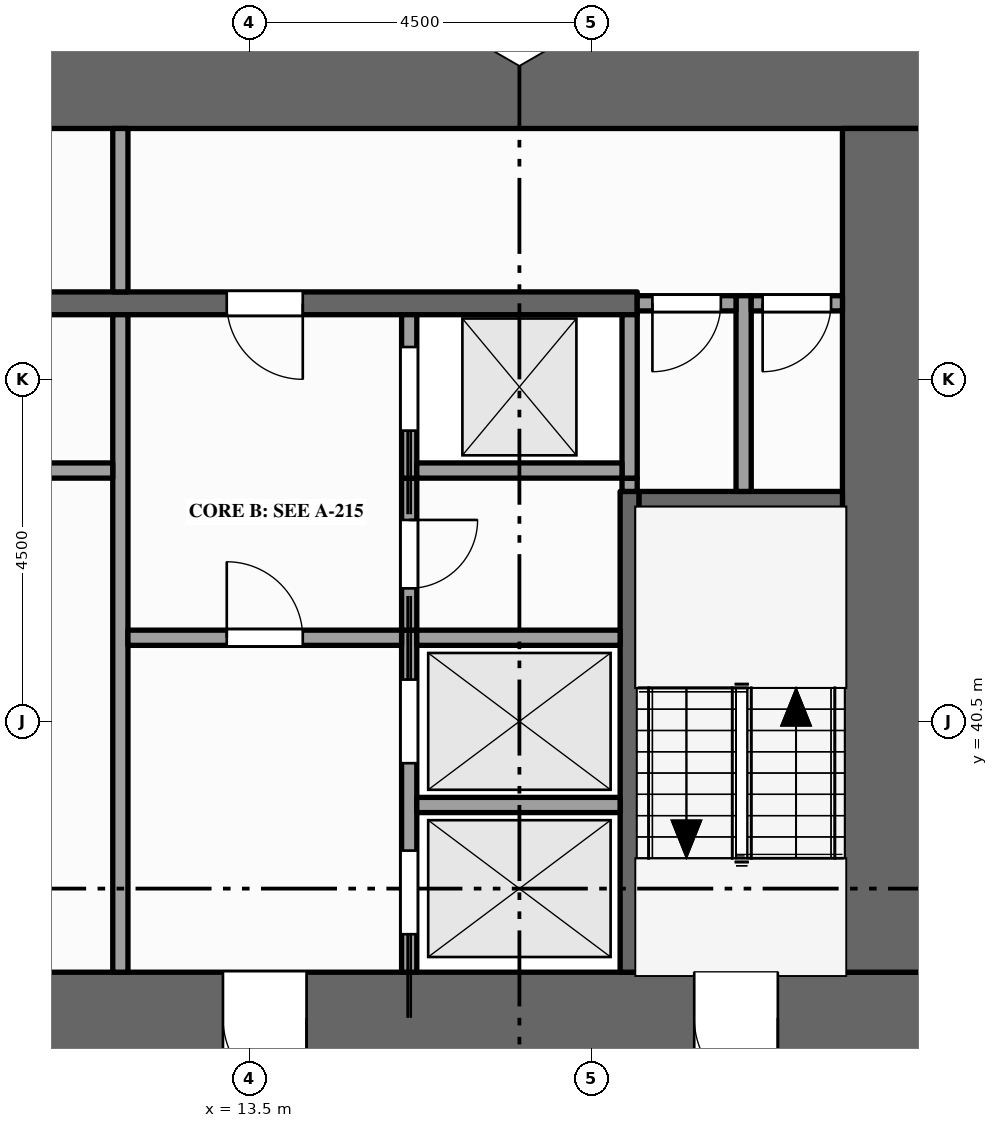
"""IFC4 building model, lengths in metres.
Left out: names, types, materials, properties, quantities, classifications, styles, units other than length and angle.
Written with IfcOpenShell. Run it as: python <this file> out.ifc"""

import sys

from ifc_helpers import new_model, si_unit, direction, frame, frame_2d, origin, place, context, subcontext, project, spatial, rectangle, extrude, element, fill, save


model = new_model("IFC4")
c1 = context("Model", 3, precision=1e-05, world=origin(), true_north=direction((0.0, 1.0)))
c2 = subcontext(c1, "Body", "Model", "MODEL_VIEW")
j1 = project(units=[si_unit("LENGTHUNIT", "METRE"), si_unit("PLANEANGLEUNIT", "RADIAN")], contexts=[c1])
p1 = place(None, origin())
s1 = spatial("IfcSite", under=j1, at=p1, CompositionType="ELEMENT")
p2 = place(p1, origin())
s2 = spatial("IfcBuilding", under=s1, at=p2, CompositionType="ELEMENT")
p3 = place(p2, frame((0.0, 0.0, 77.0)))
s3 = spatial("IfcBuildingStorey", under=s2, at=p3, CompositionType="ELEMENT", Elevation=77.0)
p4 = place(p3, frame((0.0, 36.6, -0.15), z_axis=(0.0, 0.0, 1.0), x_axis=(1.0, 0.0, 0.0)))
e1 = element("IfcWall", 1, at=p4, inside=s3, PredefinedType="SHEAR", context=c2, shape_type="SweptSolid", body=[
    extrude(rectangle(XDim=22.5, YDim=1.2, at=frame_2d((11.25, 0.0))), origin(), (0.0, 0.0, 1.0), 6.0),
])
p5 = place(p4, frame((7.1, 0.0, 0.15)))
e2 = element("IfcOpeningElement", 2, at=p5, cuts=e1, PredefinedType="OPENING", context=c2, shape_type="SweptSolid", body=[
    extrude(rectangle(XDim=1.8, YDim=2.1, at=frame_2d((0.9, 1.05))), frame((0.0, 0.61, 0.0), z_axis=(0.0, -1.0, 0.0), x_axis=(1.0, 0.0, 0.0)), (0.0, 0.0, 1.0), 1.22),
])
p6 = place(p4, frame((13.15, 0.0, 0.15)))
e3 = element("IfcOpeningElement", 3, at=p6, cuts=e1, PredefinedType="OPENING", context=c2, shape_type="SweptSolid", body=[
    extrude(rectangle(XDim=1.1, YDim=2.1, at=frame_2d((0.55, 1.05))), frame((0.0, 0.61, 0.0), z_axis=(0.0, -1.0, 0.0), x_axis=(1.0, 0.0, 0.0)), (0.0, 0.0, 1.0), 1.22),
])
p7 = place(p4, frame((2.15, 0.0, 0.15)))
e4 = element("IfcOpeningElement", 4, at=p7, cuts=e1, PredefinedType="OPENING", context=c2, shape_type="SweptSolid", body=[
    extrude(rectangle(XDim=1.1, YDim=2.1, at=frame_2d((0.55, 1.05))), frame((0.0, 0.61, 0.0), z_axis=(0.0, -1.0, 0.0), x_axis=(1.0, 0.0, 0.0)), (0.0, 0.0, 1.0), 1.22),
])
p8 = place(p4, frame((19.35, 0.0, 0.15)))
e5 = element("IfcOpeningElement", 5, at=p8, cuts=e1, PredefinedType="OPENING", context=c2, shape_type="SweptSolid", body=[
    extrude(rectangle(XDim=1.1, YDim=2.1, at=frame_2d((0.55, 1.05))), frame((0.0, 0.61, 0.0), z_axis=(0.0, -1.0, 0.0), x_axis=(1.0, 0.0, 0.0)), (0.0, 0.0, 1.0), 1.22),
])
p9 = place(p3, frame((0.0, 48.9, -0.15), z_axis=(0.0, 0.0, 1.0), x_axis=(1.0, 0.0, 0.0)))
e6 = element("IfcWall", 6, at=p9, inside=s3, PredefinedType="SHEAR", context=c2, shape_type="SweptSolid", body=[
    extrude(rectangle(XDim=22.5, YDim=1.2, at=frame_2d((11.25, 0.0))), origin(), (0.0, 0.0, 1.0), 6.0),
])
p10 = place(p3, frame((21.9, 37.2, -0.15), z_axis=(0.0, 0.0, 1.0), x_axis=(0.0, 1.0, 0.0)))
e7 = element("IfcWall", 7, at=p10, inside=s3, PredefinedType="SHEAR", context=c2, shape_type="SweptSolid", body=[
    extrude(rectangle(XDim=11.1, YDim=1.2, at=frame_2d((5.55, 0.0))), origin(), (0.0, 0.0, 1.0), 6.0),
])
p11 = place(p3, frame((11.8, 37.2, 0.0), z_axis=(0.0, 0.0, 1.0), x_axis=(0.0, 1.0, 0.0)))
e8 = element("IfcWall", 8, at=p11, inside=s3, PredefinedType="PARTITIONING", context=c2, shape_type="SweptSolid", body=[
    extrude(rectangle(XDim=8.65, YDim=0.2, at=frame_2d((4.325, 0.0))), origin(), (0.0, 0.0, 1.0), 5.85),
])
p12 = place(p3, frame((11.8, 46.15, 0.0), z_axis=(0.0, 0.0, 1.0), x_axis=(0.0, 1.0, 0.0)))
e9 = element("IfcWall", 9, at=p12, inside=s3, PredefinedType="PARTITIONING", context=c2, shape_type="SweptSolid", body=[
    extrude(rectangle(XDim=2.15, YDim=0.2, at=frame_2d((1.075, 0.0))), origin(), (0.0, 0.0, 1.0), 5.85),
])
p13 = place(p3, frame((15.6, 37.2, 0.0), z_axis=(0.0, 0.0, 1.0), x_axis=(0.0, 1.0, 0.0)))
e10 = element("IfcWall", 10, at=p13, inside=s3, PredefinedType="SOLIDWALL", context=c2, shape_type="SweptSolid", body=[
    extrude(rectangle(XDim=4.5, YDim=0.2, at=frame_2d((2.25, 0.0))), origin(), (0.0, 0.0, 1.0), 5.85),
])
p14 = place(p13, frame((0.5, 0.0, 0.012)))
e11 = element("IfcOpeningElement", 11, at=p14, cuts=e10, PredefinedType="OPENING", context=c2, shape_type="SweptSolid", body=[
    extrude(rectangle(XDim=1.1, YDim=2.1, at=frame_2d((0.55, 1.05))), frame((0.0, 0.11, 0.0), z_axis=(0.0, -1.0, 0.0), x_axis=(1.0, 0.0, 0.0)), (0.0, 0.0, 1.0), 0.22),
])
p15 = place(p13, frame((2.75, 0.0, 0.012)))
e12 = element("IfcOpeningElement", 12, at=p15, cuts=e10, PredefinedType="OPENING", context=c2, shape_type="SweptSolid", body=[
    extrude(rectangle(XDim=1.1, YDim=2.1, at=frame_2d((0.55, 1.05))), frame((0.0, 0.11, 0.0), z_axis=(0.0, -1.0, 0.0), x_axis=(1.0, 0.0, 0.0)), (0.0, 0.0, 1.0), 0.22),
])
p16 = place(p3, frame((15.6, 41.7, 0.0), z_axis=(0.0, 0.0, 1.0), x_axis=(0.0, 1.0, 0.0)))
e13 = element("IfcWall", 13, at=p16, inside=s3, PredefinedType="PARTITIONING", context=c2, shape_type="SweptSolid", body=[
    extrude(rectangle(XDim=2.0, YDim=0.2, at=frame_2d((1.0, 0.0))), origin(), (0.0, 0.0, 1.0), 5.85),
])
p17 = place(p16, frame((0.55, 0.0, 0.0)))
e14 = element("IfcOpeningElement", 14, at=p17, cuts=e13, PredefinedType="OPENING", context=c2, shape_type="SweptSolid", body=[
    extrude(rectangle(XDim=0.9, YDim=2.1, at=frame_2d((0.45, 1.05))), frame((0.0, 0.11, 0.0), z_axis=(0.0, -1.0, 0.0), x_axis=(1.0, 0.0, 0.0)), (0.0, 0.0, 1.0), 0.22),
])
p18 = place(p3, frame((15.6, 43.7, 0.0), z_axis=(0.0, 0.0, 1.0), x_axis=(0.0, 1.0, 0.0)))
e15 = element("IfcWall", 15, at=p18, inside=s3, PredefinedType="SOLIDWALL", context=c2, shape_type="SweptSolid", body=[
    extrude(rectangle(XDim=2.15, YDim=0.2, at=frame_2d((1.075, 0.0))), origin(), (0.0, 0.0, 1.0), 5.85),
])
p19 = place(p18, frame((0.625, 0.0, 0.012)))
e16 = element("IfcOpeningElement", 16, at=p19, cuts=e15, PredefinedType="OPENING", context=c2, shape_type="SweptSolid", body=[
    extrude(rectangle(XDim=1.1, YDim=2.1, at=frame_2d((0.55, 1.05))), frame((0.0, 0.11, 0.0), z_axis=(0.0, -1.0, 0.0), x_axis=(1.0, 0.0, 0.0)), (0.0, 0.0, 1.0), 0.22),
])
p20 = place(p3, frame((18.5, 37.2, 0.0), z_axis=(0.0, 0.0, 1.0), x_axis=(0.0, 1.0, 0.0)))
e17 = element("IfcWall", 17, at=p20, inside=s3, PredefinedType="SHEAR", context=c2, shape_type="SweptSolid", body=[
    extrude(rectangle(XDim=6.325, YDim=0.25, at=frame_2d((3.163, 0.0))), origin(), (0.0, 0.0, 1.0), 5.85),
])
p21 = place(p3, frame((18.5, 43.525, 0.0), z_axis=(0.0, 0.0, 1.0), x_axis=(0.0, 1.0, 0.0)))
e18 = element("IfcWall", 18, at=p21, inside=s3, PredefinedType="PARTITIONING", context=c2, shape_type="SweptSolid", body=[
    extrude(rectangle(XDim=0.175, YDim=0.2, at=frame_2d((0.087, 0.0))), origin(), (0.0, 0.0, 1.0), 5.85),
])
p22 = place(p3, frame((18.5, 43.7, 0.0), z_axis=(0.0, 0.0, 1.0), x_axis=(0.0, 1.0, 0.0)))
e19 = element("IfcWall", 19, at=p22, inside=s3, PredefinedType="SOLIDWALL", context=c2, shape_type="SweptSolid", body=[
    extrude(rectangle(XDim=2.15, YDim=0.2, at=frame_2d((1.075, 0.0))), origin(), (0.0, 0.0, 1.0), 5.85),
])
p23 = place(p3, frame((20.0, 43.525, 0.0), z_axis=(0.0, 0.0, 1.0), x_axis=(0.0, 1.0, 0.0)))
e20 = element("IfcWall", 20, at=p23, inside=s3, PredefinedType="PARTITIONING", context=c2, shape_type="SweptSolid", body=[
    extrude(rectangle(XDim=2.575, YDim=0.2, at=frame_2d((1.288, 0.0))), origin(), (0.0, 0.0, 1.0), 5.85),
])
p24 = place(p3, frame((15.7, 39.4, 0.0), z_axis=(0.0, 0.0, 1.0), x_axis=(1.0, 0.0, 0.0)))
e21 = element("IfcWall", 21, at=p24, inside=s3, PredefinedType="SOLIDWALL", context=c2, shape_type="SweptSolid", body=[
    extrude(rectangle(XDim=2.675, YDim=0.2, at=frame_2d((1.337, 0.0))), origin(), (0.0, 0.0, 1.0), 5.85),
])
p25 = place(p3, frame((11.9, 41.6, 0.0), z_axis=(0.0, 0.0, 1.0), x_axis=(1.0, 0.0, 0.0)))
e22 = element("IfcWall", 22, at=p25, inside=s3, PredefinedType="PARTITIONING", context=c2, shape_type="SweptSolid", body=[
    extrude(rectangle(XDim=3.6, YDim=0.2, at=frame_2d((1.8, 0.0))), origin(), (0.0, 0.0, 1.0), 5.85),
])
p26 = place(p25, frame((1.3, 0.0, 0.0)))
e23 = element("IfcOpeningElement", 23, at=p26, cuts=e22, PredefinedType="OPENING", context=c2, shape_type="SweptSolid", body=[
    extrude(rectangle(XDim=1.0, YDim=2.1, at=frame_2d((0.5, 1.05))), frame((0.0, 0.11, 0.0), z_axis=(0.0, -1.0, 0.0), x_axis=(1.0, 0.0, 0.0)), (0.0, 0.0, 1.0), 0.22),
])
p27 = place(p3, frame((15.7, 41.6, 0.0), z_axis=(0.0, 0.0, 1.0), x_axis=(1.0, 0.0, 0.0)))
e24 = element("IfcWall", 24, at=p27, inside=s3, PredefinedType="SOLIDWALL", context=c2, shape_type="SweptSolid", body=[
    extrude(rectangle(XDim=2.675, YDim=0.2, at=frame_2d((1.337, 0.0))), origin(), (0.0, 0.0, 1.0), 5.85),
])
p28 = place(p3, frame((18.625, 43.4, 0.0), z_axis=(0.0, 0.0, 1.0), x_axis=(1.0, 0.0, 0.0)))
e25 = element("IfcWall", 25, at=p28, inside=s3, PredefinedType="SHEAR", context=c2, shape_type="SweptSolid", body=[
    extrude(rectangle(XDim=2.675, YDim=0.25, at=frame_2d((1.337, 0.0))), origin(), (0.0, 0.0, 1.0), 5.85),
])
p29 = place(p3, frame((9.5, 43.8, 0.0), z_axis=(0.0, 0.0, 1.0), x_axis=(1.0, 0.0, 0.0)))
e26 = element("IfcWall", 26, at=p29, inside=s3, PredefinedType="PARTITIONING", context=c2, shape_type="SweptSolid", body=[
    extrude(rectangle(XDim=2.2, YDim=0.2, at=frame_2d((1.1, 0.0))), origin(), (0.0, 0.0, 1.0), 5.85),
])
p30 = place(p3, frame((15.7, 43.8, 0.0), z_axis=(0.0, 0.0, 1.0), x_axis=(1.0, 0.0, 0.0)))
e27 = element("IfcWall", 27, at=p30, inside=s3, PredefinedType="SOLIDWALL", context=c2, shape_type="SweptSolid", body=[
    extrude(rectangle(XDim=2.7, YDim=0.2, at=frame_2d((1.35, 0.0))), origin(), (0.0, 0.0, 1.0), 5.85),
])
p31 = place(p3, frame((4.1, 46.0, 0.0), z_axis=(0.0, 0.0, 1.0), x_axis=(1.0, 0.0, 0.0)))
e28 = element("IfcWall", 28, at=p31, inside=s3, PredefinedType="SHEAR", context=c2, shape_type="SweptSolid", body=[
    extrude(rectangle(XDim=14.5, YDim=0.3, at=frame_2d((7.25, 0.0))), origin(), (0.0, 0.0, 1.0), 5.85),
])
p32 = place(p31, frame((3.4, 0.0, 0.0)))
e29 = element("IfcOpeningElement", 29, at=p32, cuts=e28, PredefinedType="OPENING", context=c2, shape_type="SweptSolid", body=[
    extrude(rectangle(XDim=1.0, YDim=2.1, at=frame_2d((0.5, 1.05))), frame((0.0, 0.16, 0.0), z_axis=(0.0, -1.0, 0.0), x_axis=(1.0, 0.0, 0.0)), (0.0, 0.0, 1.0), 0.32),
])
p33 = place(p31, frame((9.1, 0.0, 0.0)))
e30 = element("IfcOpeningElement", 30, at=p33, cuts=e28, PredefinedType="OPENING", context=c2, shape_type="SweptSolid", body=[
    extrude(rectangle(XDim=1.0, YDim=2.1, at=frame_2d((0.5, 1.05))), frame((0.0, 0.16, 0.0), z_axis=(0.0, -1.0, 0.0), x_axis=(1.0, 0.0, 0.0)), (0.0, 0.0, 1.0), 0.32),
])
p34 = place(p3, frame((18.6, 46.0, 0.0), z_axis=(0.0, 0.0, 1.0), x_axis=(1.0, 0.0, 0.0)))
e31 = element("IfcWall", 31, at=p34, inside=s3, PredefinedType="PARTITIONING", context=c2, shape_type="SweptSolid", body=[
    extrude(rectangle(XDim=1.3, YDim=0.2, at=frame_2d((0.65, 0.0))), origin(), (0.0, 0.0, 1.0), 5.85),
])
p35 = place(p34, frame((0.2, 0.0, 0.0)))
e32 = element("IfcOpeningElement", 32, at=p35, cuts=e31, PredefinedType="OPENING", context=c2, shape_type="SweptSolid", body=[
    extrude(rectangle(XDim=0.9, YDim=2.1, at=frame_2d((0.45, 1.05))), frame((0.0, 0.11, 0.0), z_axis=(0.0, -1.0, 0.0), x_axis=(1.0, 0.0, 0.0)), (0.0, 0.0, 1.0), 0.22),
])
p36 = place(p3, frame((20.1, 46.0, 0.0), z_axis=(0.0, 0.0, 1.0), x_axis=(1.0, 0.0, 0.0)))
e33 = element("IfcWall", 33, at=p36, inside=s3, PredefinedType="PARTITIONING", context=c2, shape_type="SweptSolid", body=[
    extrude(rectangle(XDim=1.2, YDim=0.2, at=frame_2d((0.6, 0.0))), origin(), (0.0, 0.0, 1.0), 5.85),
])
p37 = place(p36, frame((0.15, 0.0, 0.0)))
e34 = element("IfcOpeningElement", 34, at=p37, cuts=e33, PredefinedType="OPENING", context=c2, shape_type="SweptSolid", body=[
    extrude(rectangle(XDim=0.9, YDim=2.1, at=frame_2d((0.45, 1.05))), frame((0.0, 0.11, 0.0), z_axis=(0.0, -1.0, 0.0), x_axis=(1.0, 0.0, 0.0)), (0.0, 0.0, 1.0), 0.22),
])
p38 = place(p14, origin())
e35 = element("IfcDoor", 35, at=p38, inside=s3, OperationType="SLIDING_TO_LEFT", PredefinedType="DOOR", context=c2, shape_type="SweptSolid", body=[
    extrude(rectangle(XDim=1.1, YDim=2.1, at=frame_2d((0.55, 1.05))), frame((0.0, 0.025, 0.0), z_axis=(0.0, -1.0, 0.0), x_axis=(1.0, 0.0, 0.0)), (0.0, 0.0, 1.0), 0.05),
])
fill(e11, e35)
p39 = place(p15, origin())
e36 = element("IfcDoor", 36, at=p39, inside=s3, OperationType="SLIDING_TO_RIGHT", PredefinedType="DOOR", context=c2, shape_type="SweptSolid", body=[
    extrude(rectangle(XDim=1.1, YDim=2.1, at=frame_2d((0.55, 1.05))), frame((0.0, 0.025, 0.0), z_axis=(0.0, -1.0, 0.0), x_axis=(1.0, 0.0, 0.0)), (0.0, 0.0, 1.0), 0.05),
])
fill(e12, e36)
p40 = place(p19, origin())
e37 = element("IfcDoor", 37, at=p40, inside=s3, OperationType="SLIDING_TO_LEFT", PredefinedType="DOOR", context=c2, shape_type="SweptSolid", body=[
    extrude(rectangle(XDim=1.1, YDim=2.1, at=frame_2d((0.55, 1.05))), frame((0.0, 0.025, 0.0), z_axis=(0.0, -1.0, 0.0), x_axis=(1.0, 0.0, 0.0)), (0.0, 0.0, 1.0), 0.05),
])
fill(e16, e37)
p41 = place(p6, origin())
e38 = element("IfcDoor", 38, at=p41, inside=s3, OperationType="SINGLE_SWING_RIGHT", PredefinedType="DOOR", context=c2, shape_type="SweptSolid", body=[
    extrude(rectangle(XDim=1.1, YDim=2.1, at=frame_2d((0.55, 1.05))), frame((0.0, 0.025, 0.0), z_axis=(0.0, -1.0, 0.0), x_axis=(1.0, 0.0, 0.0)), (0.0, 0.0, 1.0), 0.05),
])
fill(e3, e38)
p42 = place(p26, origin())
e39 = element("IfcDoor", 39, at=p42, inside=s3, OperationType="SINGLE_SWING_LEFT", PredefinedType="DOOR", context=c2, shape_type="SweptSolid", body=[
    extrude(rectangle(XDim=1.0, YDim=2.1, at=frame_2d((0.5, 1.05))), frame((0.0, 0.025, 0.0), z_axis=(0.0, -1.0, 0.0), x_axis=(1.0, 0.0, 0.0)), (0.0, 0.0, 1.0), 0.05),
])
fill(e23, e39)
p43 = place(p33, origin())
e40 = element("IfcDoor", 40, at=p43, inside=s3, OperationType="SINGLE_SWING_RIGHT", PredefinedType="DOOR", context=c2, shape_type="SweptSolid", body=[
    extrude(rectangle(XDim=1.0, YDim=2.1, at=frame_2d((0.5, 1.05))), frame((0.0, 0.025, 0.0), z_axis=(0.0, -1.0, 0.0), x_axis=(1.0, 0.0, 0.0)), (0.0, 0.0, 1.0), 0.05),
])
fill(e30, e40)
p44 = place(p8, origin())
e41 = element("IfcDoor", 41, at=p44, inside=s3, OperationType="SINGLE_SWING_RIGHT", PredefinedType="DOOR", context=c2, shape_type="SweptSolid", body=[
    extrude(rectangle(XDim=1.1, YDim=2.1, at=frame_2d((0.55, 1.05))), frame((0.0, 0.025, 0.0), z_axis=(0.0, -1.0, 0.0), x_axis=(1.0, 0.0, 0.0)), (0.0, 0.0, 1.0), 0.05),
])
fill(e5, e41)
p45 = place(p35, origin())
e42 = element("IfcDoor", 42, at=p45, inside=s3, OperationType="SINGLE_SWING_LEFT", PredefinedType="DOOR", context=c2, shape_type="SweptSolid", body=[
    extrude(rectangle(XDim=0.9, YDim=2.1, at=frame_2d((0.45, 1.05))), frame((0.0, 0.025, 0.0), z_axis=(0.0, -1.0, 0.0), x_axis=(1.0, 0.0, 0.0)), (0.0, 0.0, 1.0), 0.05),
])
fill(e32, e42)
p46 = place(p37, origin())
e43 = element("IfcDoor", 43, at=p46, inside=s3, OperationType="SINGLE_SWING_LEFT", PredefinedType="DOOR", context=c2, shape_type="SweptSolid", body=[
    extrude(rectangle(XDim=0.9, YDim=2.1, at=frame_2d((0.45, 1.05))), frame((0.0, 0.025, 0.0), z_axis=(0.0, -1.0, 0.0), x_axis=(1.0, 0.0, 0.0)), (0.0, 0.0, 1.0), 0.05),
])
fill(e34, e43)
p47 = place(p17, origin())
e44 = element("IfcDoor", 44, at=p47, inside=s3, OperationType="SINGLE_SWING_RIGHT", PredefinedType="DOOR", context=c2, shape_type="SweptSolid", body=[
    extrude(rectangle(XDim=0.9, YDim=2.1, at=frame_2d((0.45, 1.05))), frame((0.0, 0.025, 0.0), z_axis=(0.0, -1.0, 0.0), x_axis=(1.0, 0.0, 0.0)), (0.0, 0.0, 1.0), 0.05),
])
fill(e14, e44)
save(model, sys.argv[1])
